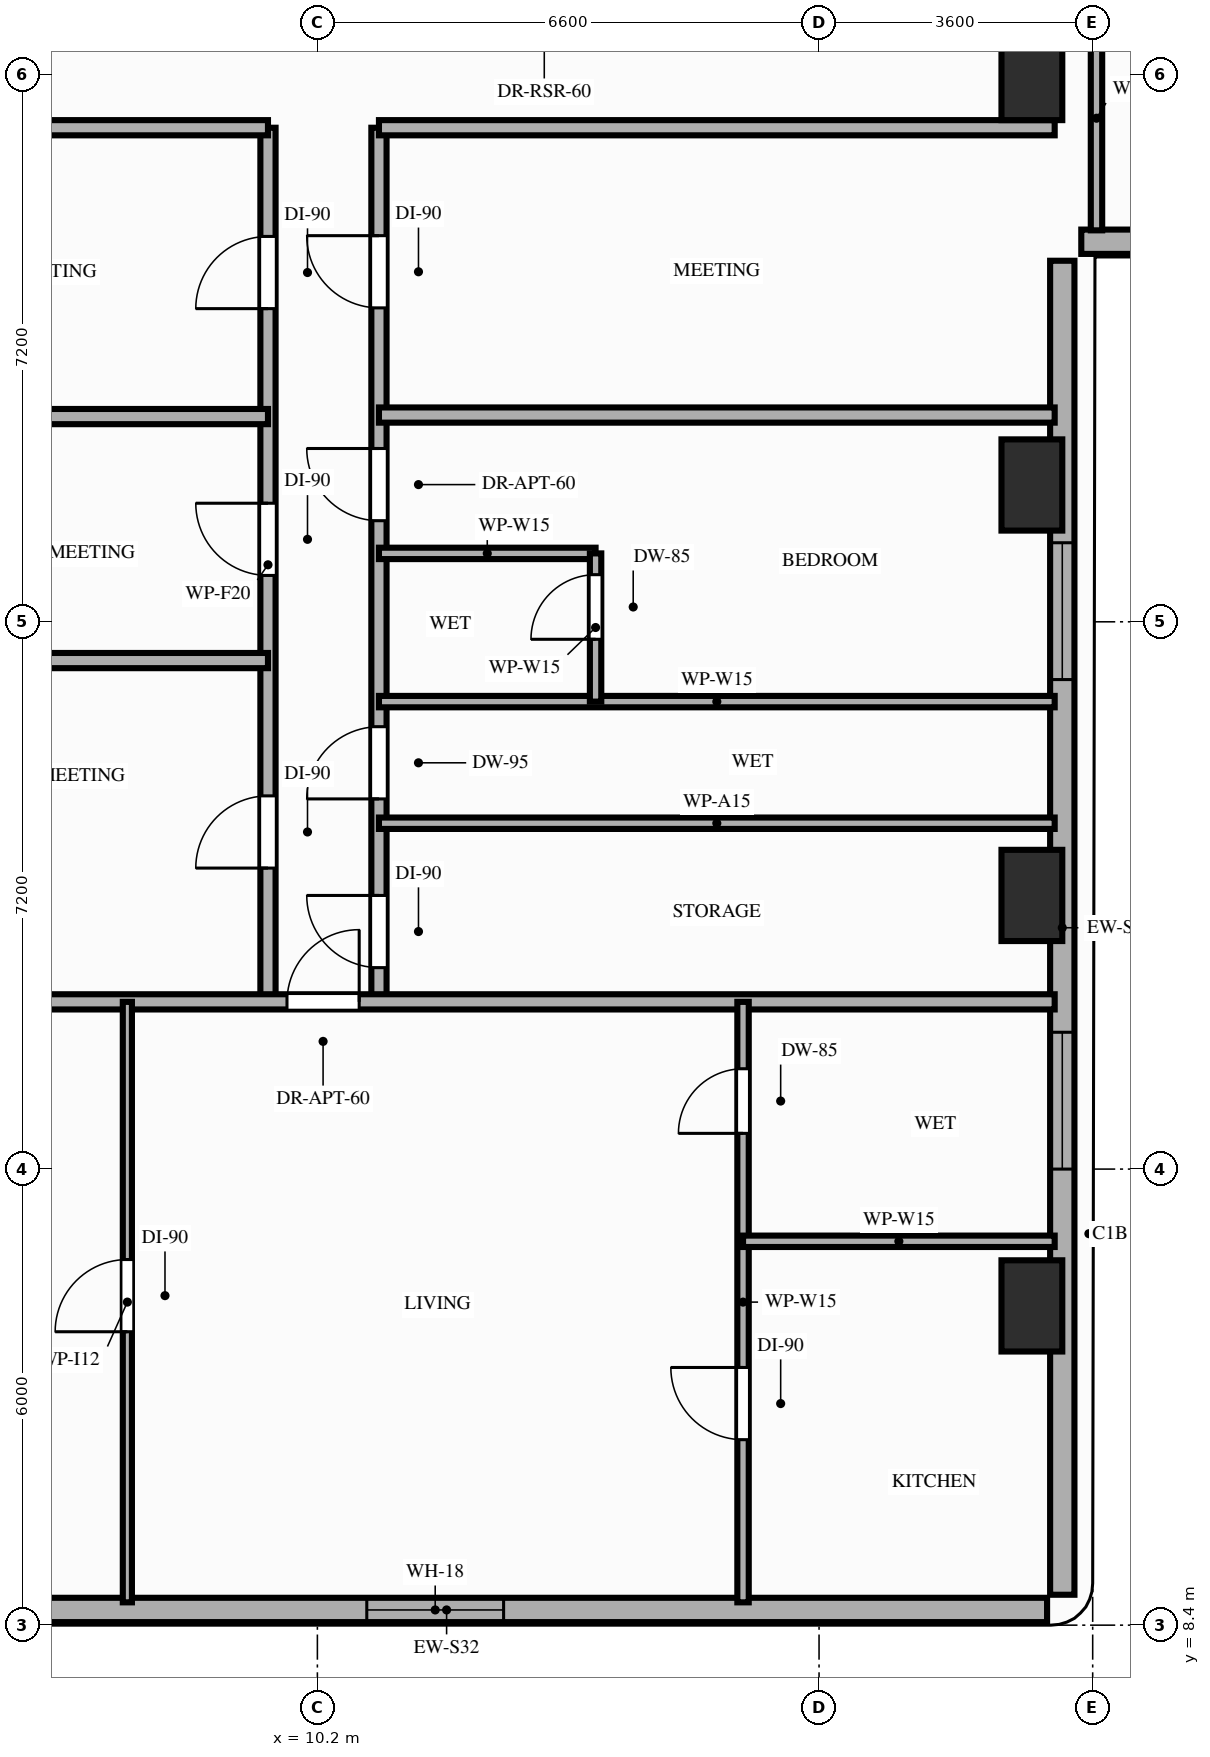
"""IFC4 building model, lengths in metres.
Left out: names, types, materials, properties, quantities, classifications, styles, units other than length and angle.
Written with IfcOpenShell. Run it as: python <this file> out.ifc"""

import sys

from ifc_helpers import new_model, si_unit, direction, frame, frame_2d, origin, origin_2d, place, context, subcontext, project, spatial, rectangle, extrude, element, fill, save


model = new_model("IFC4")
c1 = context("Model", 3, precision=1e-05, world=origin(), true_north=direction((0.0, 1.0)))
c2 = subcontext(c1, "Body", "Model", "MODEL_VIEW")
j1 = project(units=[si_unit("LENGTHUNIT", "METRE"), si_unit("PLANEANGLEUNIT", "RADIAN")], contexts=[c1])
p1 = place(None, origin())
s1 = spatial("IfcSite", under=j1, at=p1, CompositionType="ELEMENT")
p2 = place(p1, origin())
s2 = spatial("IfcBuilding", under=s1, at=p2, CompositionType="ELEMENT")
p3 = place(p2, frame((0.0, 0.0, 89.8)))
s3 = spatial("IfcBuildingStorey", under=s2, at=p3, CompositionType="ELEMENT", Elevation=89.8)
for number, where, z_axis, x_axis in (
    (1, (19.6, 12.6, 0.0), (0.0, 0.0, 1.0), (1.0, 0.0, 0.0)),
    (2, (19.6, 18.0, 0.0), (0.0, 0.0, 1.0), (1.0, 0.0, 0.0)),
    (3, (19.6, 23.4, 0.0), (0.0, 0.0, 1.0), (1.0, 0.0, 0.0)),
    (4, (19.6, 28.8, 0.0), (0.0, 0.0, 1.0), (1.0, 0.0, 0.0)),
):
    element("IfcColumn", number, at=place(p3, frame(where, z_axis=z_axis, x_axis=x_axis)), inside=s3, PredefinedType="COLUMN", context=c2, shape_type="SweptSolid", body=[
        extrude(rectangle(XDim=0.8, YDim=1.2, at=origin_2d()), origin(), (0.0, 0.0, 1.0), 3.2),
    ])
p4 = place(p3, frame((4.0, 8.6, 0.0), z_axis=(0.0, 0.0, 1.0), x_axis=(1.0, 0.0, 0.0)))
e5 = element("IfcWall", 5, at=p4, inside=s3, PredefinedType="STANDARD", context=c2, shape_type="SweptSolid", body=[
    extrude(rectangle(XDim=15.8, YDim=0.32, at=frame_2d((7.9, 0.0))), origin(), (0.0, 0.0, 1.0), 3.02),
])
p5 = place(p4, frame((6.85, 0.0, 0.85)))
e6 = element("IfcOpeningElement", 6, at=p5, cuts=e5, PredefinedType="OPENING", context=c2, shape_type="SweptSolid", body=[
    extrude(rectangle(XDim=1.8, YDim=1.75, at=frame_2d((0.9, 0.875))), frame((0.0, 0.17, 0.0), z_axis=(0.0, -1.0, 0.0), x_axis=(1.0, 0.0, 0.0)), (0.0, 0.0, 1.0), 0.34),
])
p6 = place(p3, frame((20.0, 8.8, 0.0), z_axis=(0.0, 0.0, 1.0), x_axis=(0.0, 1.0, 0.0)))
e7 = element("IfcWall", 7, at=p6, inside=s3, PredefinedType="STANDARD", context=c2, shape_type="SweptSolid", body=[
    extrude(rectangle(XDim=17.55, YDim=0.32, at=frame_2d((8.775, 0.0))), origin(), (0.0, 0.0, 1.0), 2.4),
])
p7 = place(p6, frame((12.04, 0.0, 0.85)))
e8 = element("IfcOpeningElement", 8, at=p7, cuts=e7, PredefinedType="OPENING", context=c2, shape_type="SweptSolid", body=[
    extrude(rectangle(XDim=1.8, YDim=1.3, at=frame_2d((0.9, 0.65))), frame((0.0, 0.17, 0.0), z_axis=(0.0, -1.0, 0.0), x_axis=(1.0, 0.0, 0.0)), (0.0, 0.0, 1.0), 0.34),
])
p8 = place(p6, frame((5.6, 0.0, 0.85)))
e9 = element("IfcOpeningElement", 9, at=p8, cuts=e7, PredefinedType="OPENING", context=c2, shape_type="SweptSolid", body=[
    extrude(rectangle(XDim=1.8, YDim=1.3, at=frame_2d((0.9, 0.65))), frame((0.0, 0.17, 0.0), z_axis=(0.0, -1.0, 0.0), x_axis=(1.0, 0.0, 0.0)), (0.0, 0.0, 1.0), 0.34),
])
p9 = place(p3, frame((20.25, 26.6, 0.0), z_axis=(0.0, 0.0, 1.0), x_axis=(1.0, 0.0, 0.0)))
e10 = element("IfcWall", 10, at=p9, inside=s3, PredefinedType="STANDARD", context=c2, shape_type="SweptSolid", body=[
    extrude(rectangle(XDim=26.15, YDim=0.32, at=frame_2d((13.075, 0.0))), origin(), (0.0, 0.0, 1.0), 2.7),
])
p10 = place(p9, frame((13.9, 0.0, 0.0)))
e11 = element("IfcOpeningElement", 11, at=p10, cuts=e10, PredefinedType="OPENING", context=c2, shape_type="SweptSolid", body=[
    extrude(rectangle(XDim=1.3, YDim=2.08, at=frame_2d((0.65, 1.04))), frame((0.0, 0.17, 0.0), z_axis=(0.0, -1.0, 0.0), x_axis=(1.0, 0.0, 0.0)), (0.0, 0.0, 1.0), 0.34),
])
p11 = place(p9, frame((2.25, 0.0, 0.85)))
e12 = element("IfcOpeningElement", 12, at=p11, cuts=e10, PredefinedType="OPENING", context=c2, shape_type="SweptSolid", body=[
    extrude(rectangle(XDim=1.8, YDim=1.6, at=frame_2d((0.9, 0.8))), frame((0.0, 0.17, 0.0), z_axis=(0.0, -1.0, 0.0), x_axis=(1.0, 0.0, 0.0)), (0.0, 0.0, 1.0), 0.34),
])
p12 = place(p9, frame((7.75, 0.0, 0.85)))
e13 = element("IfcOpeningElement", 13, at=p12, cuts=e10, PredefinedType="OPENING", context=c2, shape_type="SweptSolid", body=[
    extrude(rectangle(XDim=1.8, YDim=1.6, at=frame_2d((0.9, 0.8))), frame((0.0, 0.17, 0.0), z_axis=(0.0, -1.0, 0.0), x_axis=(1.0, 0.0, 0.0)), (0.0, 0.0, 1.0), 0.34),
])
p13 = place(p9, frame((22.25, 0.0, 0.85)))
e14 = element("IfcOpeningElement", 14, at=p13, cuts=e10, PredefinedType="OPENING", context=c2, shape_type="SweptSolid", body=[
    extrude(rectangle(XDim=1.8, YDim=1.6, at=frame_2d((0.9, 0.8))), frame((0.0, 0.17, 0.0), z_axis=(0.0, -1.0, 0.0), x_axis=(1.0, 0.0, 0.0)), (0.0, 0.0, 1.0), 0.34),
])
p14 = place(p3, frame((9.55, 16.6, 0.0), z_axis=(0.0, 0.0, 1.0), x_axis=(0.0, 1.0, 0.0)))
e15 = element("IfcWall", 15, at=p14, inside=s3, PredefinedType="PARTITIONING", context=c2, shape_type="SweptSolid", body=[
    extrude(rectangle(XDim=11.5, YDim=0.2, at=frame_2d((5.75, 0.0))), origin(), (0.0, 0.0, 1.0), 2.4),
])
p15 = place(p14, frame((1.76, 0.0, 0.0)))
e16 = element("IfcOpeningElement", 16, at=p15, cuts=e15, PredefinedType="OPENING", context=c2, shape_type="SweptSolid", body=[
    extrude(rectangle(XDim=0.95, YDim=2.15, at=frame_2d((0.475, 1.075))), frame((0.0, 0.11, 0.0), z_axis=(0.0, -1.0, 0.0), x_axis=(1.0, 0.0, 0.0)), (0.0, 0.0, 1.0), 0.22),
])
p16 = place(p14, frame((5.61, 0.0, 0.0)))
e17 = element("IfcOpeningElement", 17, at=p16, cuts=e15, PredefinedType="OPENING", context=c2, shape_type="SweptSolid", body=[
    extrude(rectangle(XDim=0.95, YDim=2.15, at=frame_2d((0.475, 1.075))), frame((0.0, 0.11, 0.0), z_axis=(0.0, -1.0, 0.0), x_axis=(1.0, 0.0, 0.0)), (0.0, 0.0, 1.0), 0.22),
])
p17 = place(p14, frame((9.12, 0.0, 0.0)))
e18 = element("IfcOpeningElement", 18, at=p17, cuts=e15, PredefinedType="OPENING", context=c2, shape_type="SweptSolid", body=[
    extrude(rectangle(XDim=0.95, YDim=2.15, at=frame_2d((0.475, 1.075))), frame((0.0, 0.11, 0.0), z_axis=(0.0, -1.0, 0.0), x_axis=(1.0, 0.0, 0.0)), (0.0, 0.0, 1.0), 0.22),
])
p18 = place(p3, frame((11.01, 16.6, 0.0), z_axis=(0.0, 0.0, 1.0), x_axis=(0.0, 1.0, 0.0)))
e19 = element("IfcWall", 19, at=p18, inside=s3, PredefinedType="PARTITIONING", context=c2, shape_type="SweptSolid", body=[
    extrude(rectangle(XDim=11.5, YDim=0.2, at=frame_2d((5.75, 0.0))), origin(), (0.0, 0.0, 1.0), 2.4),
])
p19 = place(p18, frame((0.45, 0.0, 0.0)))
e20 = element("IfcOpeningElement", 20, at=p19, cuts=e19, PredefinedType="OPENING", context=c2, shape_type="SweptSolid", body=[
    extrude(rectangle(XDim=0.95, YDim=2.15, at=frame_2d((0.475, 1.075))), frame((0.0, 0.11, 0.0), z_axis=(0.0, -1.0, 0.0), x_axis=(1.0, 0.0, 0.0)), (0.0, 0.0, 1.0), 0.22),
])
p20 = place(p18, frame((2.67, 0.0, 0.0)))
e21 = element("IfcOpeningElement", 21, at=p20, cuts=e19, PredefinedType="OPENING", context=c2, shape_type="SweptSolid", body=[
    extrude(rectangle(XDim=0.95, YDim=2.1, at=frame_2d((0.475, 1.05))), frame((0.0, 0.11, 0.0), z_axis=(0.0, -1.0, 0.0), x_axis=(1.0, 0.0, 0.0)), (0.0, 0.0, 1.0), 0.22),
])
p21 = place(p18, frame((9.13, 0.0, 0.0)))
e22 = element("IfcOpeningElement", 22, at=p21, cuts=e19, PredefinedType="OPENING", context=c2, shape_type="SweptSolid", body=[
    extrude(rectangle(XDim=0.95, YDim=2.15, at=frame_2d((0.475, 1.075))), frame((0.0, 0.11, 0.0), z_axis=(0.0, -1.0, 0.0), x_axis=(1.0, 0.0, 0.0)), (0.0, 0.0, 1.0), 0.22),
])
p22 = place(p18, frame((6.33, 0.0, 0.0)))
e23 = element("IfcOpeningElement", 23, at=p22, cuts=e19, PredefinedType="OPENING", context=c2, shape_type="SweptSolid", body=[
    extrude(rectangle(XDim=0.95, YDim=2.15, at=frame_2d((0.475, 1.075))), frame((0.0, 0.11, 0.0), z_axis=(0.0, -1.0, 0.0), x_axis=(1.0, 0.0, 0.0)), (0.0, 0.0, 1.0), 0.22),
])
p23 = place(p3, frame((3.9, 16.6, 0.0), z_axis=(0.0, 0.0, 1.0), x_axis=(1.0, 0.0, 0.0)))
e24 = element("IfcWall", 24, at=p23, inside=s3, PredefinedType="PARTITIONING", context=c2, shape_type="SweptSolid", body=[
    extrude(rectangle(XDim=16.0, YDim=0.2, at=frame_2d((8.0, 0.0))), origin(), (0.0, 0.0, 1.0), 2.4),
])
p24 = place(p23, frame((5.9, 0.0, 0.0)))
e25 = element("IfcOpeningElement", 25, at=p24, cuts=e24, PredefinedType="OPENING", context=c2, shape_type="SweptSolid", body=[
    extrude(rectangle(XDim=0.95, YDim=2.15, at=frame_2d((0.475, 1.075))), frame((0.0, 0.11, 0.0), z_axis=(0.0, -1.0, 0.0), x_axis=(1.0, 0.0, 0.0)), (0.0, 0.0, 1.0), 0.22),
])
p25 = place(p3, frame((3.9, 28.1, 0.0), z_axis=(0.0, 0.0, 1.0), x_axis=(1.0, 0.0, 0.0)))
e26 = element("IfcWall", 26, at=p25, inside=s3, PredefinedType="PARTITIONING", context=c2, shape_type="SweptSolid", body=[
    extrude(rectangle(XDim=5.65, YDim=0.2, at=frame_2d((2.825, 0.0))), origin(), (0.0, 0.0, 1.0), 2.4),
])
p26 = place(p3, frame((11.01, 28.1, 0.0), z_axis=(0.0, 0.0, 1.0), x_axis=(1.0, 0.0, 0.0)))
e27 = element("IfcWall", 27, at=p26, inside=s3, PredefinedType="PARTITIONING", context=c2, shape_type="SweptSolid", body=[
    extrude(rectangle(XDim=8.89, YDim=0.2, at=frame_2d((4.445, 0.0))), origin(), (0.0, 0.0, 1.0), 2.4),
])
p27 = place(p3, frame((20.45, 26.75, 0.0), z_axis=(0.0, 0.0, 1.0), x_axis=(0.0, 1.0, 0.0)))
e28 = element("IfcWall", 28, at=p27, inside=s3, PredefinedType="PARTITIONING", context=c2, shape_type="SweptSolid", body=[
    extrude(rectangle(XDim=2.95, YDim=0.15, at=frame_2d((1.475, 0.0))), origin(), (0.0, 0.0, 1.0), 2.4),
])
for number, where, z_axis, x_axis in (
    (29, (3.9, 21.09, 0.0), (0.0, 0.0, 1.0), (1.0, 0.0, 0.0)),
    (30, (3.9, 24.3, 0.0), (0.0, 0.0, 1.0), (1.0, 0.0, 0.0)),
):
    element("IfcWall", number, at=place(p3, frame(where, z_axis=z_axis, x_axis=x_axis)), inside=s3, PredefinedType="PARTITIONING", context=c2, shape_type="SweptSolid", body=[
        extrude(rectangle(XDim=5.65, YDim=0.2, at=frame_2d((2.825, 0.0))), origin(), (0.0, 0.0, 1.0), 2.4),
    ])
p28 = place(p3, frame((7.7, 8.7, 0.0), z_axis=(0.0, 0.0, 1.0), x_axis=(0.0, 1.0, 0.0)))
e31 = element("IfcWall", 31, at=p28, inside=s3, PredefinedType="PARTITIONING", context=c2, shape_type="SweptSolid", body=[
    extrude(rectangle(XDim=7.9, YDim=0.12, at=frame_2d((3.95, 0.0))), origin(), (0.0, 0.0, 1.0), 2.4),
])
p29 = place(p28, frame((3.56, 0.0, 0.0)))
e32 = element("IfcOpeningElement", 32, at=p29, cuts=e31, PredefinedType="OPENING", context=c2, shape_type="SweptSolid", body=[
    extrude(rectangle(XDim=0.95, YDim=2.15, at=frame_2d((0.475, 1.075))), frame((0.0, 0.07, 0.0), z_axis=(0.0, -1.0, 0.0), x_axis=(1.0, 0.0, 0.0)), (0.0, 0.0, 1.0), 0.14),
])
p30 = place(p3, frame((15.8, 8.7, 0.0), z_axis=(0.0, 0.0, 1.0), x_axis=(0.0, 1.0, 0.0)))
e33 = element("IfcWall", 33, at=p30, inside=s3, PredefinedType="PARTITIONING", context=c2, shape_type="SweptSolid", body=[
    extrude(rectangle(XDim=7.9, YDim=0.15, at=frame_2d((3.95, 0.0))), origin(), (0.0, 0.0, 1.0), 2.4),
])
p31 = place(p30, frame((2.14, 0.0, 0.0)))
e34 = element("IfcOpeningElement", 34, at=p31, cuts=e33, PredefinedType="OPENING", context=c2, shape_type="SweptSolid", body=[
    extrude(rectangle(XDim=0.95, YDim=2.15, at=frame_2d((0.475, 1.075))), frame((0.0, 0.085, 0.0), z_axis=(0.0, -1.0, 0.0), x_axis=(1.0, 0.0, 0.0)), (0.0, 0.0, 1.0), 0.17),
])
p32 = place(p30, frame((6.17, 0.0, 0.0)))
e35 = element("IfcOpeningElement", 35, at=p32, cuts=e33, PredefinedType="OPENING", context=c2, shape_type="SweptSolid", body=[
    extrude(rectangle(XDim=0.85, YDim=2.1, at=frame_2d((0.425, 1.05))), frame((0.0, 0.085, 0.0), z_axis=(0.0, -1.0, 0.0), x_axis=(1.0, 0.0, 0.0)), (0.0, 0.0, 1.0), 0.17),
])
p33 = place(p3, frame((15.8, 13.45, 0.0), z_axis=(0.0, 0.0, 1.0), x_axis=(1.0, 0.0, 0.0)))
e36 = element("IfcWall", 36, at=p33, inside=s3, PredefinedType="PARTITIONING", context=c2, shape_type="SweptSolid", body=[
    extrude(rectangle(XDim=4.1, YDim=0.15, at=frame_2d((2.05, 0.0))), origin(), (0.0, 0.0, 1.0), 2.4),
])
for number, where, z_axis, x_axis in (
    (37, (11.01, 18.95, 0.0), (0.0, 0.0, 1.0), (1.0, 0.0, 0.0)),
    (38, (11.01, 20.55, 0.0), (0.0, 0.0, 1.0), (1.0, 0.0, 0.0)),
):
    element("IfcWall", number, at=place(p3, frame(where, z_axis=z_axis, x_axis=x_axis)), inside=s3, PredefinedType="PARTITIONING", context=c2, shape_type="SweptSolid", body=[
        extrude(rectangle(XDim=8.89, YDim=0.15, at=frame_2d((4.445, 0.0))), origin(), (0.0, 0.0, 1.0), 2.4),
    ])
p34 = place(p3, frame((11.01, 24.32, 0.0), z_axis=(0.0, 0.0, 1.0), x_axis=(1.0, 0.0, 0.0)))
e39 = element("IfcWall", 39, at=p34, inside=s3, PredefinedType="PARTITIONING", context=c2, shape_type="SweptSolid", body=[
    extrude(rectangle(XDim=8.89, YDim=0.2, at=frame_2d((4.445, 0.0))), origin(), (0.0, 0.0, 1.0), 2.4),
])
p35 = place(p3, frame((11.01, 22.5, 0.0), z_axis=(0.0, 0.0, 1.0), x_axis=(1.0, 0.0, 0.0)))
e40 = element("IfcWall", 40, at=p35, inside=s3, PredefinedType="PARTITIONING", context=c2, shape_type="SweptSolid", body=[
    extrude(rectangle(XDim=2.85, YDim=0.15, at=frame_2d((1.425, 0.0))), origin(), (0.0, 0.0, 1.0), 3.02),
])
p36 = place(p3, frame((13.86, 20.55, 0.0), z_axis=(0.0, 0.0, 1.0), x_axis=(0.0, 1.0, 0.0)))
e41 = element("IfcWall", 41, at=p36, inside=s3, PredefinedType="PARTITIONING", context=c2, shape_type="SweptSolid", body=[
    extrude(rectangle(XDim=1.95, YDim=0.15, at=frame_2d((0.975, 0.0))), origin(), (0.0, 0.0, 1.0), 3.02),
])
p37 = place(p36, frame((0.82, 0.0, 0.0)))
e42 = element("IfcOpeningElement", 42, at=p37, cuts=e41, PredefinedType="OPENING", context=c2, shape_type="SweptSolid", body=[
    extrude(rectangle(XDim=0.85, YDim=2.1, at=frame_2d((0.425, 1.05))), frame((0.0, 0.085, 0.0), z_axis=(0.0, -1.0, 0.0), x_axis=(1.0, 0.0, 0.0)), (0.0, 0.0, 1.0), 0.17),
])
p38 = place(p5, origin())
e43 = element("IfcWindow", 43, at=p38, inside=s3, PartitioningType="SINGLE_PANEL", PredefinedType="WINDOW", context=c2, shape_type="SweptSolid", body=[
    extrude(rectangle(XDim=1.8, YDim=1.75, at=frame_2d((0.9, 0.875))), frame((0.0, 0.03, 0.0), z_axis=(0.0, -1.0, 0.0), x_axis=(1.0, 0.0, 0.0)), (0.0, 0.0, 1.0), 0.06),
])
fill(e6, e43)
p39 = place(p7, origin())
e44 = element("IfcWindow", 44, at=p39, inside=s3, PartitioningType="SINGLE_PANEL", PredefinedType="WINDOW", context=c2, shape_type="SweptSolid", body=[
    extrude(rectangle(XDim=1.8, YDim=1.3, at=frame_2d((0.9, 0.65))), frame((0.0, 0.03, 0.0), z_axis=(0.0, -1.0, 0.0), x_axis=(1.0, 0.0, 0.0)), (0.0, 0.0, 1.0), 0.06),
])
fill(e8, e44)
p40 = place(p8, origin())
e45 = element("IfcWindow", 45, at=p40, inside=s3, PartitioningType="SINGLE_PANEL", PredefinedType="WINDOW", context=c2, shape_type="SweptSolid", body=[
    extrude(rectangle(XDim=1.8, YDim=1.3, at=frame_2d((0.9, 0.65))), frame((0.0, 0.03, 0.0), z_axis=(0.0, -1.0, 0.0), x_axis=(1.0, 0.0, 0.0)), (0.0, 0.0, 1.0), 0.06),
])
fill(e9, e45)
p41 = place(p15, origin())
e46 = element("IfcDoor", 46, at=p41, inside=s3, OperationType="SINGLE_SWING_LEFT", PredefinedType="DOOR", context=c2, shape_type="SweptSolid", body=[
    extrude(rectangle(XDim=0.95, YDim=2.15, at=frame_2d((0.475, 1.075))), frame((0.0, 0.025, 0.0), z_axis=(0.0, -1.0, 0.0), x_axis=(1.0, 0.0, 0.0)), (0.0, 0.0, 1.0), 0.05),
])
fill(e16, e46)
p42 = place(p16, origin())
e47 = element("IfcDoor", 47, at=p42, inside=s3, OperationType="SINGLE_SWING_RIGHT", PredefinedType="DOOR", context=c2, shape_type="SweptSolid", body=[
    extrude(rectangle(XDim=0.95, YDim=2.15, at=frame_2d((0.475, 1.075))), frame((0.0, 0.025, 0.0), z_axis=(0.0, -1.0, 0.0), x_axis=(1.0, 0.0, 0.0)), (0.0, 0.0, 1.0), 0.05),
])
fill(e17, e47)
p43 = place(p17, origin())
e48 = element("IfcDoor", 48, at=p43, inside=s3, OperationType="SINGLE_SWING_LEFT", PredefinedType="DOOR", context=c2, shape_type="SweptSolid", body=[
    extrude(rectangle(XDim=0.95, YDim=2.15, at=frame_2d((0.475, 1.075))), frame((0.0, 0.025, 0.0), z_axis=(0.0, -1.0, 0.0), x_axis=(1.0, 0.0, 0.0)), (0.0, 0.0, 1.0), 0.05),
])
fill(e18, e48)
p44 = place(p24, origin())
e49 = element("IfcDoor", 49, at=p44, inside=s3, OperationType="SINGLE_SWING_RIGHT", PredefinedType="DOOR", context=c2, shape_type="SweptSolid", body=[
    extrude(rectangle(XDim=0.95, YDim=2.15, at=frame_2d((0.475, 1.075))), frame((0.0, 0.025, 0.0), z_axis=(0.0, -1.0, 0.0), x_axis=(1.0, 0.0, 0.0)), (0.0, 0.0, 1.0), 0.05),
])
fill(e25, e49)
p45 = place(p29, origin())
e50 = element("IfcDoor", 50, at=p45, inside=s3, OperationType="SINGLE_SWING_LEFT", PredefinedType="DOOR", context=c2, shape_type="SweptSolid", body=[
    extrude(rectangle(XDim=0.95, YDim=2.15, at=frame_2d((0.475, 1.075))), frame((0.0, 0.025, 0.0), z_axis=(0.0, -1.0, 0.0), x_axis=(1.0, 0.0, 0.0)), (0.0, 0.0, 1.0), 0.05),
])
fill(e32, e50)
p46 = place(p31, origin())
e51 = element("IfcDoor", 51, at=p46, inside=s3, OperationType="SINGLE_SWING_RIGHT", PredefinedType="DOOR", context=c2, shape_type="SweptSolid", body=[
    extrude(rectangle(XDim=0.95, YDim=2.15, at=frame_2d((0.475, 1.075))), frame((0.0, 0.025, 0.0), z_axis=(0.0, -1.0, 0.0), x_axis=(1.0, 0.0, 0.0)), (0.0, 0.0, 1.0), 0.05),
])
fill(e34, e51)
p47 = place(p32, origin())
e52 = element("IfcDoor", 52, at=p47, inside=s3, OperationType="SINGLE_SWING_LEFT", PredefinedType="DOOR", context=c2, shape_type="SweptSolid", body=[
    extrude(rectangle(XDim=0.85, YDim=2.1, at=frame_2d((0.425, 1.05))), frame((0.0, 0.025, 0.0), z_axis=(0.0, -1.0, 0.0), x_axis=(1.0, 0.0, 0.0)), (0.0, 0.0, 1.0), 0.05),
])
fill(e35, e52)
p48 = place(p19, origin())
e53 = element("IfcDoor", 53, at=p48, inside=s3, OperationType="SINGLE_SWING_RIGHT", PredefinedType="DOOR", context=c2, shape_type="SweptSolid", body=[
    extrude(rectangle(XDim=0.95, YDim=2.15, at=frame_2d((0.475, 1.075))), frame((0.0, 0.025, 0.0), z_axis=(0.0, -1.0, 0.0), x_axis=(1.0, 0.0, 0.0)), (0.0, 0.0, 1.0), 0.05),
])
fill(e20, e53)
p49 = place(p20, origin())
e54 = element("IfcDoor", 54, at=p49, inside=s3, OperationType="SINGLE_SWING_LEFT", PredefinedType="DOOR", context=c2, shape_type="SweptSolid", body=[
    extrude(rectangle(XDim=0.95, YDim=2.1, at=frame_2d((0.475, 1.05))), frame((0.0, 0.025, 0.0), z_axis=(0.0, -1.0, 0.0), x_axis=(1.0, 0.0, 0.0)), (0.0, 0.0, 1.0), 0.05),
])
fill(e21, e54)
p50 = place(p21, origin())
e55 = element("IfcDoor", 55, at=p50, inside=s3, OperationType="SINGLE_SWING_RIGHT", PredefinedType="DOOR", context=c2, shape_type="SweptSolid", body=[
    extrude(rectangle(XDim=0.95, YDim=2.15, at=frame_2d((0.475, 1.075))), frame((0.0, 0.025, 0.0), z_axis=(0.0, -1.0, 0.0), x_axis=(1.0, 0.0, 0.0)), (0.0, 0.0, 1.0), 0.05),
])
fill(e22, e55)
p51 = place(p37, origin())
e56 = element("IfcDoor", 56, at=p51, inside=s3, OperationType="SINGLE_SWING_LEFT", PredefinedType="DOOR", context=c2, shape_type="SweptSolid", body=[
    extrude(rectangle(XDim=0.85, YDim=2.1, at=frame_2d((0.425, 1.05))), frame((0.0, 0.025, 0.0), z_axis=(0.0, -1.0, 0.0), x_axis=(1.0, 0.0, 0.0)), (0.0, 0.0, 1.0), 0.05),
])
fill(e42, e56)
p52 = place(p22, origin())
e57 = element("IfcDoor", 57, at=p52, inside=s3, OperationType="SINGLE_SWING_RIGHT", PredefinedType="DOOR", context=c2, shape_type="SweptSolid", body=[
    extrude(rectangle(XDim=0.95, YDim=2.15, at=frame_2d((0.475, 1.075))), frame((0.0, 0.025, 0.0), z_axis=(0.0, -1.0, 0.0), x_axis=(1.0, 0.0, 0.0)), (0.0, 0.0, 1.0), 0.05),
])
fill(e23, e57)
save(model, sys.argv[1])
